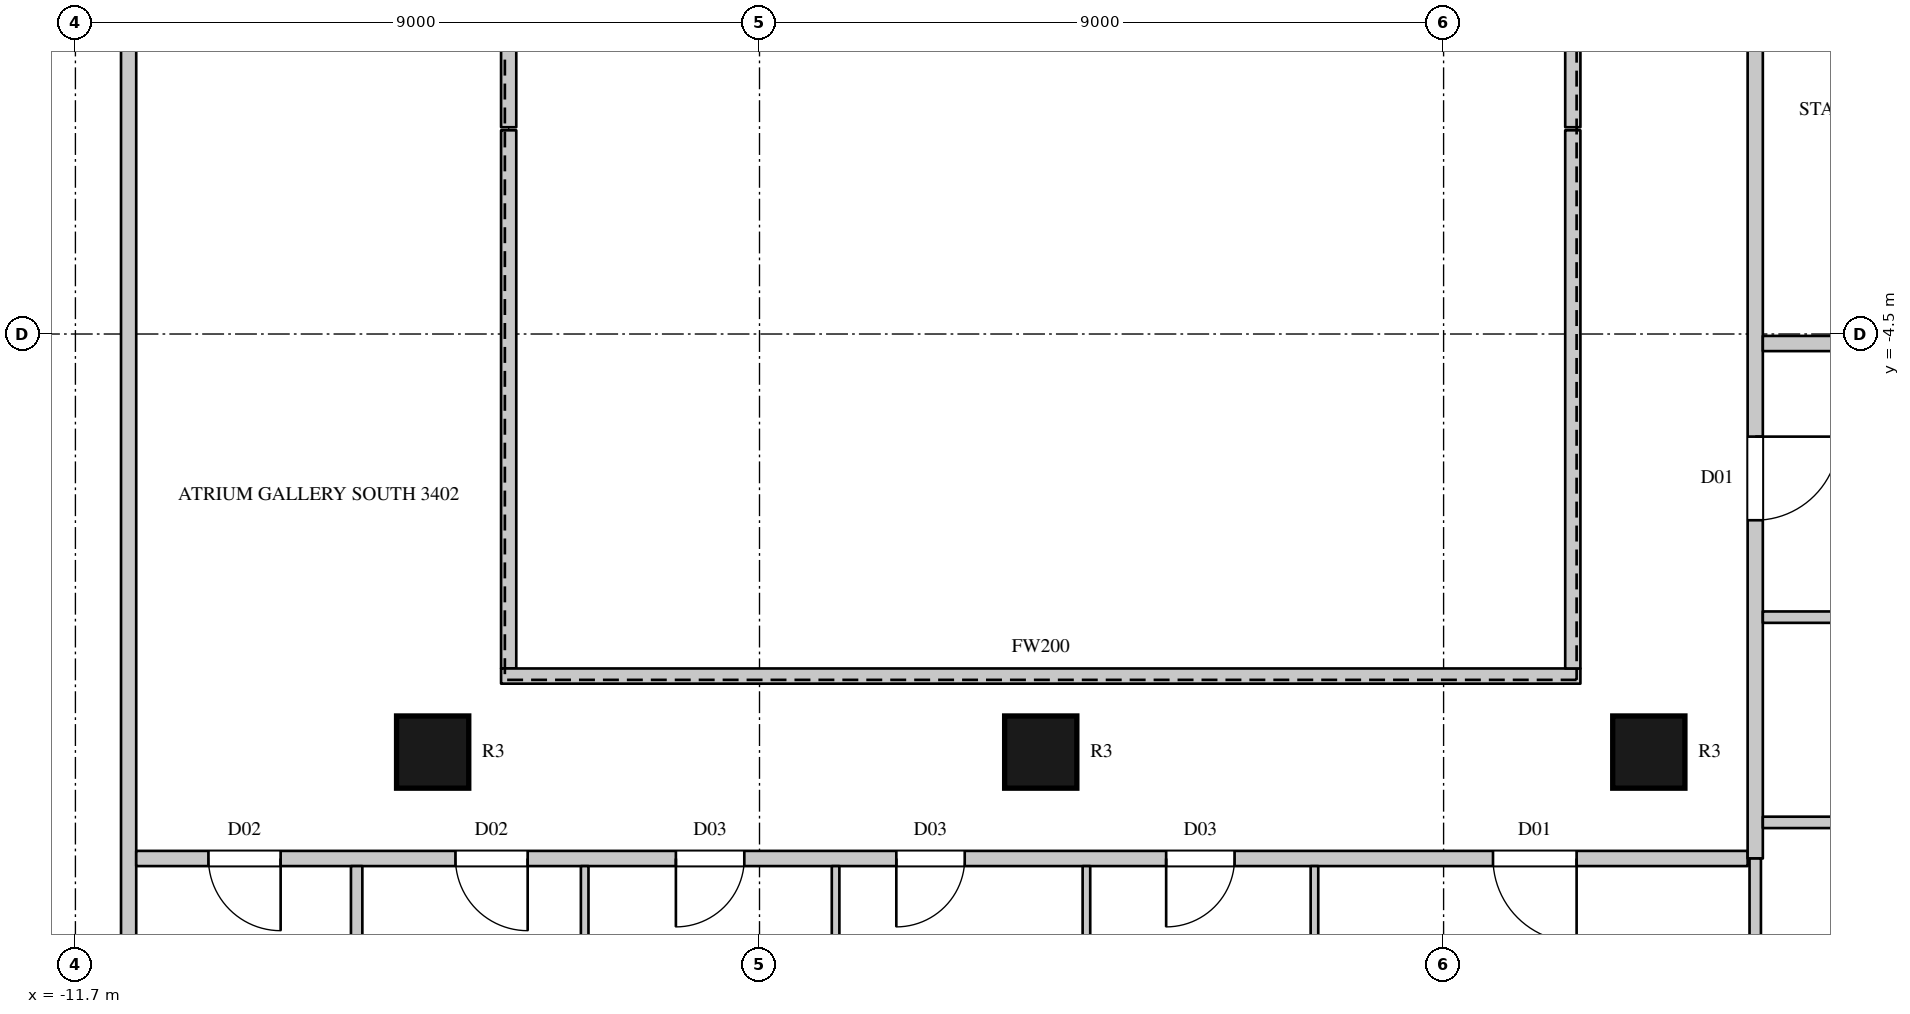
"""IFC4 building model, lengths in metres.
Left out: names, types, materials, properties, quantities, classifications, styles, units other than length and angle.
Written with IfcOpenShell. Run it as: python <this file> out.ifc"""

import sys

from ifc_helpers import new_model, si_unit, direction, frame, frame_2d, origin, origin_2d, place, context, subcontext, project, spatial, rectangle, circle, extrude, element, fill, save


model = new_model("IFC4")
c1 = context("Model", 3, precision=1e-05, world=origin(), true_north=direction((0.0, 1.0)))
c2 = subcontext(c1, "Body", "Model", "MODEL_VIEW")
j1 = project(units=[si_unit("LENGTHUNIT", "METRE"), si_unit("PLANEANGLEUNIT", "RADIAN")], contexts=[c1])
p1 = place(None, origin())
s1 = spatial("IfcSite", under=j1, at=p1, CompositionType="ELEMENT")
p2 = place(p1, origin())
s2 = spatial("IfcBuilding", under=s1, at=p2, CompositionType="ELEMENT")
p3 = place(p2, frame((0.0, 0.0, 160.5)))
s3 = spatial("IfcBuildingStorey", under=s2, at=p3, CompositionType="ELEMENT", Elevation=160.5)
for number, where, z_axis, x_axis in (
    (1, (-7.0, -10.0, 0.0), (0.0, 0.0, 1.0), (1.0, 0.0, 0.0)),
    (2, (1.0, -10.0, 0.0), (0.0, 0.0, 1.0), (1.0, 0.0, 0.0)),
    (3, (9.0, -10.0, 0.0), (0.0, 0.0, 1.0), (1.0, 0.0, 0.0)),
):
    element("IfcColumn", number, at=place(p3, frame(where, z_axis=z_axis, x_axis=x_axis)), inside=s3, PredefinedType="COLUMN", context=c2, shape_type="SweptSolid", body=[
        extrude(circle(Radius=0.475, at=origin_2d()), origin(), (0.0, 0.0, 1.0), 4.1),
    ])
p4 = place(p3, frame((-11.0, -14.8, 0.0), z_axis=(0.0, 0.0, 1.0), x_axis=(0.0, 1.0, 0.0)))
e4 = element("IfcWall", 4, at=p4, inside=s3, PredefinedType="PARTITIONING", context=c2, shape_type="SweptSolid", body=[
    extrude(rectangle(XDim=29.6, YDim=0.2, at=frame_2d((14.8, 0.0))), origin(), (0.0, 0.0, 1.0), 3.8),
])
p5 = place(p4, frame((19.25, 0.0, 0.0)))
e5 = element("IfcOpeningElement", 5, at=p5, cuts=e4, PredefinedType="OPENING", context=c2, shape_type="SweptSolid", body=[
    extrude(rectangle(XDim=1.5, YDim=2.4, at=frame_2d((0.75, 1.2))), frame((0.0, 0.11, 0.0), z_axis=(0.0, -1.0, 0.0), x_axis=(1.0, 0.0, 0.0)), (0.0, 0.0, 1.0), 0.22),
])
p6 = place(p3, frame((-10.9, -11.4, 0.0), z_axis=(0.0, 0.0, 1.0), x_axis=(1.0, 0.0, 0.0)))
e6 = element("IfcWall", 6, at=p6, inside=s3, PredefinedType="PARTITIONING", context=c2, shape_type="SweptSolid", body=[
    extrude(rectangle(XDim=21.2, YDim=0.2, at=frame_2d((10.6, 0.0))), origin(), (0.0, 0.0, 1.0), 3.8),
])
p7 = place(p6, frame((0.95, 0.0, 0.0)))
e7 = element("IfcOpeningElement", 7, at=p7, cuts=e6, PredefinedType="OPENING", context=c2, shape_type="SweptSolid", body=[
    extrude(rectangle(XDim=0.95, YDim=2.2, at=frame_2d((0.475, 1.1))), frame((0.0, 0.11, 0.0), z_axis=(0.0, -1.0, 0.0), x_axis=(1.0, 0.0, 0.0)), (0.0, 0.0, 1.0), 0.22),
])
p8 = place(p6, frame((4.2, 0.0, 0.0)))
e8 = element("IfcOpeningElement", 8, at=p8, cuts=e6, PredefinedType="OPENING", context=c2, shape_type="SweptSolid", body=[
    extrude(rectangle(XDim=0.95, YDim=2.2, at=frame_2d((0.475, 1.1))), frame((0.0, 0.11, 0.0), z_axis=(0.0, -1.0, 0.0), x_axis=(1.0, 0.0, 0.0)), (0.0, 0.0, 1.0), 0.22),
])
p9 = place(p6, frame((7.1, 0.0, 0.0)))
e9 = element("IfcOpeningElement", 9, at=p9, cuts=e6, PredefinedType="OPENING", context=c2, shape_type="SweptSolid", body=[
    extrude(rectangle(XDim=0.9, YDim=2.2, at=frame_2d((0.45, 1.1))), frame((0.0, 0.11, 0.0), z_axis=(0.0, -1.0, 0.0), x_axis=(1.0, 0.0, 0.0)), (0.0, 0.0, 1.0), 0.22),
])
p10 = place(p6, frame((10.0, 0.0, 0.0)))
e10 = element("IfcOpeningElement", 10, at=p10, cuts=e6, PredefinedType="OPENING", context=c2, shape_type="SweptSolid", body=[
    extrude(rectangle(XDim=0.9, YDim=2.2, at=frame_2d((0.45, 1.1))), frame((0.0, 0.11, 0.0), z_axis=(0.0, -1.0, 0.0), x_axis=(1.0, 0.0, 0.0)), (0.0, 0.0, 1.0), 0.22),
])
p11 = place(p6, frame((13.55, 0.0, 0.0)))
e11 = element("IfcOpeningElement", 11, at=p11, cuts=e6, PredefinedType="OPENING", context=c2, shape_type="SweptSolid", body=[
    extrude(rectangle(XDim=0.9, YDim=2.2, at=frame_2d((0.45, 1.1))), frame((0.0, 0.11, 0.0), z_axis=(0.0, -1.0, 0.0), x_axis=(1.0, 0.0, 0.0)), (0.0, 0.0, 1.0), 0.22),
])
p12 = place(p6, frame((17.85, 0.0, 0.0)))
e12 = element("IfcOpeningElement", 12, at=p12, cuts=e6, PredefinedType="OPENING", context=c2, shape_type="SweptSolid", body=[
    extrude(rectangle(XDim=1.1, YDim=2.4, at=frame_2d((0.55, 1.2))), frame((0.0, 0.11, 0.0), z_axis=(0.0, -1.0, 0.0), x_axis=(1.0, 0.0, 0.0)), (0.0, 0.0, 1.0), 0.22),
])
p13 = place(p3, frame((-6.0, -8.9, 0.0), z_axis=(0.0, 0.0, 1.0), x_axis=(0.0, 1.0, 0.0)))
e13 = element("IfcWall", 13, at=p13, inside=s3, PredefinedType="PARTITIONING", context=c2, shape_type="SweptSolid", body=[
    extrude(rectangle(XDim=7.08, YDim=0.2, at=frame_2d((3.54, 0.0))), origin(), (0.0, 0.0, 1.0), 3.8),
])
p14 = place(p3, frame((-6.1, -9.0, 0.0), z_axis=(0.0, 0.0, 1.0), x_axis=(1.0, 0.0, 0.0)))
e14 = element("IfcWall", 14, at=p14, inside=s3, PredefinedType="PARTITIONING", context=c2, shape_type="SweptSolid", body=[
    extrude(rectangle(XDim=14.2, YDim=0.2, at=frame_2d((7.1, 0.0))), origin(), (0.0, 0.0, 1.0), 3.8),
])
p15 = place(p3, frame((-6.0, -1.78, 0.0), z_axis=(0.0, 0.0, 1.0), x_axis=(0.0, 1.0, 0.0)))
e15 = element("IfcWall", 15, at=p15, inside=s3, PredefinedType="PARTITIONING", context=c2, shape_type="SweptSolid", body=[
    extrude(rectangle(XDim=10.68, YDim=0.2, at=frame_2d((5.34, 0.0))), origin(), (0.0, 0.0, 1.0), 3.8),
])
p16 = place(p3, frame((8.0, -8.9, 0.0), z_axis=(0.0, 0.0, 1.0), x_axis=(0.0, 1.0, 0.0)))
e16 = element("IfcWall", 16, at=p16, inside=s3, PredefinedType="PARTITIONING", context=c2, shape_type="SweptSolid", body=[
    extrude(rectangle(XDim=7.08, YDim=0.2, at=frame_2d((3.54, 0.0))), origin(), (0.0, 0.0, 1.0), 3.8),
])
p17 = place(p3, frame((8.0, -1.78, 0.0), z_axis=(0.0, 0.0, 1.0), x_axis=(0.0, 1.0, 0.0)))
e17 = element("IfcWall", 17, at=p17, inside=s3, PredefinedType="PARTITIONING", context=c2, shape_type="SweptSolid", body=[
    extrude(rectangle(XDim=10.68, YDim=0.2, at=frame_2d((5.34, 0.0))), origin(), (0.0, 0.0, 1.0), 3.8),
])
p18 = place(p3, frame((10.4, -11.4, 0.0), z_axis=(0.0, 0.0, 1.0), x_axis=(0.0, 1.0, 0.0)))
e18 = element("IfcWall", 18, at=p18, inside=s3, PredefinedType="PARTITIONING", context=c2, shape_type="SweptSolid", body=[
    extrude(rectangle(XDim=23.5, YDim=0.2, at=frame_2d((11.75, 0.0))), origin(), (0.0, 0.0, 1.0), 3.8),
])
p19 = place(p18, frame((12.1, 0.0, 0.0)))
e19 = element("IfcOpeningElement", 19, at=p19, cuts=e18, PredefinedType="OPENING", context=c2, shape_type="SweptSolid", body=[
    extrude(rectangle(XDim=1.5, YDim=2.4, at=frame_2d((0.75, 1.2))), frame((0.0, 0.11, 0.0), z_axis=(0.0, -1.0, 0.0), x_axis=(1.0, 0.0, 0.0)), (0.0, 0.0, 1.0), 0.22),
])
p20 = place(p18, frame((19.25, 0.0, 0.0)))
e20 = element("IfcOpeningElement", 20, at=p20, cuts=e18, PredefinedType="OPENING", context=c2, shape_type="SweptSolid", body=[
    extrude(rectangle(XDim=1.1, YDim=2.4, at=frame_2d((0.55, 1.2))), frame((0.0, 0.11, 0.0), z_axis=(0.0, -1.0, 0.0), x_axis=(1.0, 0.0, 0.0)), (0.0, 0.0, 1.0), 0.22),
])
p21 = place(p18, frame((4.45, 0.0, 0.0)))
e21 = element("IfcOpeningElement", 21, at=p21, cuts=e18, PredefinedType="OPENING", context=c2, shape_type="SweptSolid", body=[
    extrude(rectangle(XDim=1.1, YDim=2.4, at=frame_2d((0.55, 1.2))), frame((0.0, 0.11, 0.0), z_axis=(0.0, -1.0, 0.0), x_axis=(1.0, 0.0, 0.0)), (0.0, 0.0, 1.0), 0.22),
])
p22 = place(p3, frame((10.5, -4.625, 0.0), z_axis=(0.0, 0.0, 1.0), x_axis=(1.0, 0.0, 0.0)))
e22 = element("IfcWall", 22, at=p22, inside=s3, PredefinedType="PARTITIONING", context=c2, shape_type="SweptSolid", body=[
    extrude(rectangle(XDim=4.175, YDim=0.2, at=frame_2d((2.087, 0.0))), origin(), (0.0, 0.0, 1.0), 3.8),
])
p23 = place(p3, frame((-8.0, -16.7, 0.0), z_axis=(0.0, 0.0, 1.0), x_axis=(0.0, 1.0, 0.0)))
e23 = element("IfcWall", 23, at=p23, inside=s3, PredefinedType="PARTITIONING", context=c2, shape_type="SweptSolid", body=[
    extrude(rectangle(XDim=5.2, YDim=0.15, at=frame_2d((2.6, 0.0))), origin(), (0.0, 0.0, 1.0), 3.8),
])
p24 = place(p3, frame((10.4, -16.7, 0.0), z_axis=(0.0, 0.0, 1.0), x_axis=(0.0, 1.0, 0.0)))
e24 = element("IfcWall", 24, at=p24, inside=s3, PredefinedType="PARTITIONING", context=c2, shape_type="SweptSolid", body=[
    extrude(rectangle(XDim=5.3, YDim=0.15, at=frame_2d((2.65, 0.0))), origin(), (0.0, 0.0, 1.0), 3.8),
])
p25 = place(p3, frame((10.5, -10.925, 0.0), z_axis=(0.0, 0.0, 1.0), x_axis=(1.0, 0.0, 0.0)))
e25 = element("IfcWall", 25, at=p25, inside=s3, PredefinedType="PARTITIONING", context=c2, shape_type="SweptSolid", body=[
    extrude(rectangle(XDim=2.606, YDim=0.15, at=frame_2d((1.303, 0.0))), origin(), (0.0, 0.0, 1.0), 3.8),
])
p26 = place(p25, frame((1.2, 0.0, 0.0)))
e26 = element("IfcOpeningElement", 26, at=p26, cuts=e25, PredefinedType="OPENING", context=c2, shape_type="SweptSolid", body=[
    extrude(rectangle(XDim=0.95, YDim=2.2, at=frame_2d((0.475, 1.1))), frame((0.0, 0.085, 0.0), z_axis=(0.0, -1.0, 0.0), x_axis=(1.0, 0.0, 0.0)), (0.0, 0.0, 1.0), 0.17),
])
p27 = place(p3, frame((10.5, -8.225, 0.0), z_axis=(0.0, 0.0, 1.0), x_axis=(1.0, 0.0, 0.0)))
e27 = element("IfcWall", 27, at=p27, inside=s3, PredefinedType="PARTITIONING", context=c2, shape_type="SweptSolid", body=[
    extrude(rectangle(XDim=3.575, YDim=0.15, at=frame_2d((1.788, 0.0))), origin(), (0.0, 0.0, 1.0), 3.15),
])
for number, where, z_axis, x_axis in (
    (28, (-5.0, -16.7, 0.0), (0.0, 0.0, 1.0), (0.0, 1.0, 0.0)),
    (29, (-1.699, -16.7, 0.0), (0.0, 0.0, 1.0), (0.0, 1.0, 0.0)),
):
    element("IfcWall", number, at=place(p3, frame(where, z_axis=z_axis, x_axis=x_axis)), inside=s3, PredefinedType="PARTITIONING", context=c2, shape_type="SweptSolid", body=[
        extrude(rectangle(XDim=5.2, YDim=0.1, at=frame_2d((2.6, 0.0))), origin(), (0.0, 0.0, 1.0), 3.8),
    ])
p28 = place(p3, frame((1.601, -16.7, 0.0), z_axis=(0.0, 0.0, 1.0), x_axis=(0.0, 1.0, 0.0)))
e30 = element("IfcWall", 30, at=p28, inside=s3, PredefinedType="PARTITIONING", context=c2, shape_type="SweptSolid", body=[
    extrude(rectangle(XDim=5.2, YDim=0.1, at=frame_2d((2.6, 0.0))), origin(), (0.0, 0.0, 1.0), 3.15),
])
p29 = place(p3, frame((4.601, -16.7, 0.0), z_axis=(0.0, 0.0, 1.0), x_axis=(0.0, 1.0, 0.0)))
e31 = element("IfcWall", 31, at=p29, inside=s3, PredefinedType="PARTITIONING", context=c2, shape_type="SweptSolid", body=[
    extrude(rectangle(XDim=5.2, YDim=0.1, at=frame_2d((2.6, 0.0))), origin(), (0.0, 0.0, 1.0), 3.8),
])
p30 = place(p7, origin())
e32 = element("IfcDoor", 32, at=p30, inside=s3, OperationType="SINGLE_SWING_LEFT", PredefinedType="DOOR", context=c2, shape_type="SweptSolid", body=[
    extrude(rectangle(XDim=0.95, YDim=2.2, at=frame_2d((0.475, 1.1))), frame((0.0, 0.025, 0.0), z_axis=(0.0, -1.0, 0.0), x_axis=(1.0, 0.0, 0.0)), (0.0, 0.0, 1.0), 0.05),
])
fill(e7, e32)
p31 = place(p8, origin())
e33 = element("IfcDoor", 33, at=p31, inside=s3, OperationType="SINGLE_SWING_LEFT", PredefinedType="DOOR", context=c2, shape_type="SweptSolid", body=[
    extrude(rectangle(XDim=0.95, YDim=2.2, at=frame_2d((0.475, 1.1))), frame((0.0, 0.025, 0.0), z_axis=(0.0, -1.0, 0.0), x_axis=(1.0, 0.0, 0.0)), (0.0, 0.0, 1.0), 0.05),
])
fill(e8, e33)
p32 = place(p9, origin())
e34 = element("IfcDoor", 34, at=p32, inside=s3, OperationType="SINGLE_SWING_RIGHT", PredefinedType="DOOR", context=c2, shape_type="SweptSolid", body=[
    extrude(rectangle(XDim=0.9, YDim=2.2, at=frame_2d((0.45, 1.1))), frame((0.0, 0.025, 0.0), z_axis=(0.0, -1.0, 0.0), x_axis=(1.0, 0.0, 0.0)), (0.0, 0.0, 1.0), 0.05),
])
fill(e9, e34)
p33 = place(p10, origin())
e35 = element("IfcDoor", 35, at=p33, inside=s3, OperationType="SINGLE_SWING_RIGHT", PredefinedType="DOOR", context=c2, shape_type="SweptSolid", body=[
    extrude(rectangle(XDim=0.9, YDim=2.2, at=frame_2d((0.45, 1.1))), frame((0.0, 0.025, 0.0), z_axis=(0.0, -1.0, 0.0), x_axis=(1.0, 0.0, 0.0)), (0.0, 0.0, 1.0), 0.05),
])
fill(e10, e35)
p34 = place(p11, origin())
e36 = element("IfcDoor", 36, at=p34, inside=s3, OperationType="SINGLE_SWING_RIGHT", PredefinedType="DOOR", context=c2, shape_type="SweptSolid", body=[
    extrude(rectangle(XDim=0.9, YDim=2.2, at=frame_2d((0.45, 1.1))), frame((0.0, 0.025, 0.0), z_axis=(0.0, -1.0, 0.0), x_axis=(1.0, 0.0, 0.0)), (0.0, 0.0, 1.0), 0.05),
])
fill(e11, e36)
p35 = place(p12, origin())
e37 = element("IfcDoor", 37, at=p35, inside=s3, OperationType="SINGLE_SWING_LEFT", PredefinedType="DOOR", context=c2, shape_type="SweptSolid", body=[
    extrude(rectangle(XDim=1.1, YDim=2.4, at=frame_2d((0.55, 1.2))), frame((0.0, 0.025, 0.0), z_axis=(0.0, -1.0, 0.0), x_axis=(1.0, 0.0, 0.0)), (0.0, 0.0, 1.0), 0.05),
])
fill(e12, e37)
p36 = place(p21, origin())
e38 = element("IfcDoor", 38, at=p36, inside=s3, OperationType="SINGLE_SWING_LEFT", PredefinedType="DOOR", context=c2, shape_type="SweptSolid", body=[
    extrude(rectangle(XDim=1.1, YDim=2.4, at=frame_2d((0.55, 1.2))), frame((0.0, 0.025, 0.0), z_axis=(0.0, -1.0, 0.0), x_axis=(1.0, 0.0, 0.0)), (0.0, 0.0, 1.0), 0.05),
])
fill(e21, e38)
save(model, sys.argv[1])
